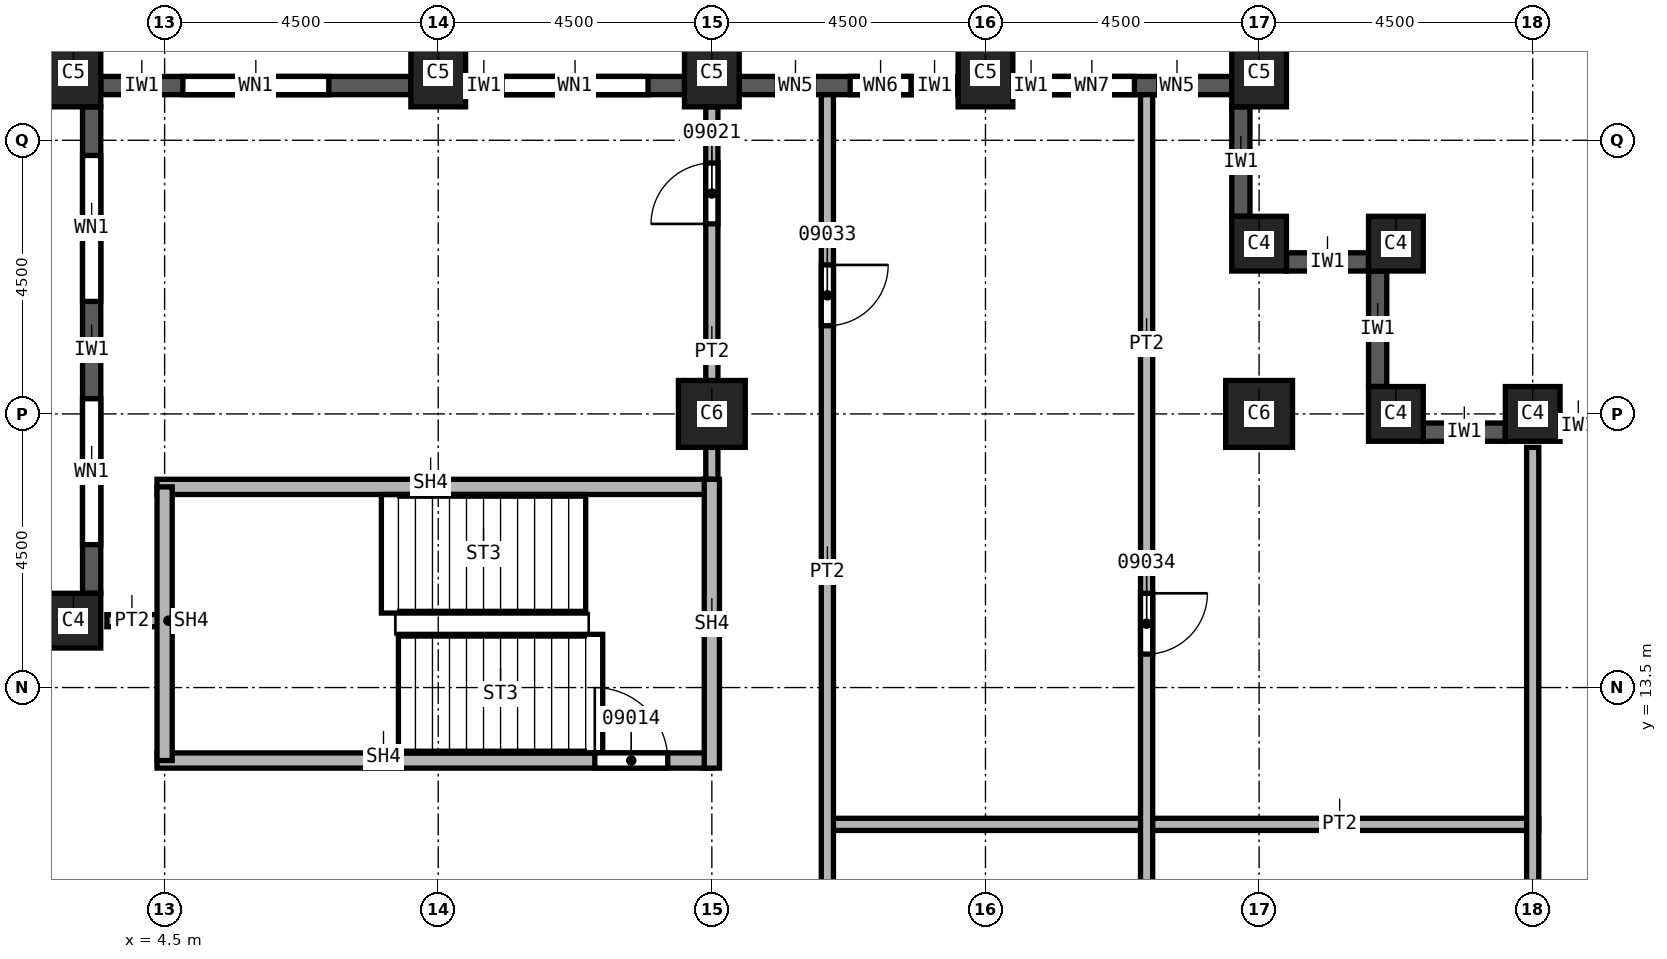
"""IFC4 building model, lengths in metres.
Left out: names, types, materials, properties, quantities, classifications, styles, units other than length and angle.
Written with IfcOpenShell. Run it as: python <this file> out.ifc"""

import sys

from ifc_helpers import new_model, si_unit, direction, frame, frame_2d, origin, origin_2d, place, context, subcontext, project, spatial, rectangle, extrude, element, fill, save


model = new_model("IFC4")
c1 = context("Model", 3, precision=1e-05, world=origin(), true_north=direction((0.0, 1.0)))
c2 = subcontext(c1, "Body", "Model", "MODEL_VIEW")
j1 = project(units=[si_unit("LENGTHUNIT", "METRE"), si_unit("PLANEANGLEUNIT", "RADIAN")], contexts=[c1])
p1 = place(None, origin())
s1 = spatial("IfcSite", under=j1, at=p1, CompositionType="ELEMENT")
p2 = place(p1, origin())
s2 = spatial("IfcBuilding", under=s1, at=p2, CompositionType="ELEMENT")
p3 = place(p2, frame((0.0, 0.0, 166.0)))
s3 = spatial("IfcBuildingStorey", under=s2, at=p3, CompositionType="ELEMENT", Elevation=166.0)
for number, where, z_axis, x_axis in (
    (1, (13.5, 18.0, 0.0), (0.0, 0.0, 1.0), (1.0, 0.0, 0.0)),
    (2, (22.5, 18.0, 0.0), (0.0, 0.0, 1.0), (1.0, 0.0, 0.0)),
):
    element("IfcColumn", number, at=place(p3, frame(where, z_axis=z_axis, x_axis=x_axis)), inside=s3, PredefinedType="COLUMN", context=c2, shape_type="SweptSolid", body=[
        extrude(rectangle(XDim=1.1, YDim=1.1, at=origin_2d()), origin(), (0.0, 0.0, 1.0), 3.7),
    ])
p4 = place(p3, frame((27.0, 18.0, 0.0), z_axis=(0.0, 0.0, 1.0), x_axis=(1.0, 0.0, 0.0)))
e3 = element("IfcColumn", 3, at=p4, inside=s3, PredefinedType="COLUMN", context=c2, shape_type="SweptSolid", body=[
    extrude(rectangle(XDim=0.9, YDim=0.9, at=origin_2d()), origin(), (0.0, 0.0, 1.0), 3.7),
])
for number, where, z_axis, x_axis in (
    (4, (3.0, 23.6, 0.0), (0.0, 0.0, 1.0), (1.0, 0.0, 0.0)),
    (5, (9.0, 23.6, 0.0), (0.0, 0.0, 1.0), (1.0, 0.0, 0.0)),
    (6, (13.5, 23.6, 0.0), (0.0, 0.0, 1.0), (1.0, 0.0, 0.0)),
    (7, (18.0, 23.6, 0.0), (0.0, 0.0, 1.0), (1.0, 0.0, 0.0)),
    (8, (22.5, 23.6, 0.0), (0.0, 0.0, 1.0), (1.0, 0.0, 0.0)),
):
    element("IfcColumn", number, at=place(p3, frame(where, z_axis=z_axis, x_axis=x_axis)), inside=s3, PredefinedType="COLUMN", context=c2, shape_type="SweptSolid", body=[
        extrude(rectangle(XDim=0.9, YDim=1.1, at=origin_2d()), origin(), (0.0, 0.0, 1.0), 3.7),
    ])
for number, where, z_axis, x_axis in (
    (9, (3.0, 14.6, 0.0), (0.0, 0.0, 1.0), (1.0, 0.0, 0.0)),
    (10, (22.5, 20.8, 0.0), (0.0, 0.0, 1.0), (1.0, 0.0, 0.0)),
    (11, (24.75, 20.8, 0.0), (0.0, 0.0, 1.0), (1.0, 0.0, 0.0)),
    (12, (24.75, 18.0, 0.0), (0.0, 0.0, 1.0), (1.0, 0.0, 0.0)),
):
    element("IfcColumn", number, at=place(p3, frame(where, z_axis=z_axis, x_axis=x_axis)), inside=s3, PredefinedType="COLUMN", context=c2, shape_type="SweptSolid", body=[
        extrude(rectangle(XDim=0.9, YDim=0.9, at=origin_2d()), origin(), (0.0, 0.0, 1.0), 3.7),
    ])
p5 = place(p3, frame((31.05, 17.8, 0.0), z_axis=(0.0, 0.0, 1.0), x_axis=(-1.0, 0.0, 0.0)))
e13 = element("IfcWall", 13, at=p5, inside=s3, PredefinedType="SOLIDWALL", context=c2, shape_type="SweptSolid", body=[
    extrude(rectangle(XDim=3.6, YDim=0.3, at=frame_2d((1.8, 0.0))), origin(), (0.0, 0.0, 1.0), 3.1),
])
p6 = place(p5, frame((0.6, 0.0, 0.8)))
e14 = element("IfcOpeningElement", 14, at=p6, cuts=e13, PredefinedType="OPENING", context=c2, shape_type="SweptSolid", body=[
    extrude(rectangle(XDim=2.4, YDim=1.95, at=frame_2d((1.2, 0.975))), frame((0.0, 0.15, 0.0), z_axis=(0.0, -1.0, 0.0), x_axis=(1.0, 0.0, 0.0)), (0.0, 0.0, 1.0), 0.3),
])
p7 = place(p3, frame((26.55, 17.7, 0.0), z_axis=(0.0, 0.0, 1.0), x_axis=(-1.0, 0.0, 0.0)))
e15 = element("IfcWall", 15, at=p7, inside=s3, PredefinedType="SOLIDWALL", context=c2, shape_type="SweptSolid", body=[
    extrude(rectangle(XDim=1.35, YDim=0.3, at=frame_2d((0.675, 0.0))), origin(), (0.0, 0.0, 1.0), 3.1),
])
p8 = place(p3, frame((24.45, 18.45, 0.0), z_axis=(0.0, 0.0, 1.0), x_axis=(0.0, 1.0, 0.0)))
e16 = element("IfcWall", 16, at=p8, inside=s3, PredefinedType="SOLIDWALL", context=c2, shape_type="SweptSolid", body=[
    extrude(rectangle(XDim=1.9, YDim=0.3, at=frame_2d((0.95, 0.0))), origin(), (0.0, 0.0, 1.0), 3.1),
])
p9 = place(p3, frame((24.3, 20.5, 0.0), z_axis=(0.0, 0.0, 1.0), x_axis=(-1.0, 0.0, 0.0)))
e17 = element("IfcWall", 17, at=p9, inside=s3, PredefinedType="SOLIDWALL", context=c2, shape_type="SweptSolid", body=[
    extrude(rectangle(XDim=1.35, YDim=0.3, at=frame_2d((0.675, 0.0))), origin(), (0.0, 0.0, 1.0), 3.1),
])
p10 = place(p3, frame((22.2, 21.25, 0.0), z_axis=(0.0, 0.0, 1.0), x_axis=(0.0, 1.0, 0.0)))
e18 = element("IfcWall", 18, at=p10, inside=s3, PredefinedType="SOLIDWALL", context=c2, shape_type="SweptSolid", body=[
    extrude(rectangle(XDim=1.8, YDim=0.3, at=frame_2d((0.9, 0.0))), origin(), (0.0, 0.0, 1.0), 3.1),
])
p11 = place(p3, frame((22.05, 23.4, 0.0), z_axis=(0.0, 0.0, 1.0), x_axis=(-1.0, 0.0, 0.0)))
e19 = element("IfcWall", 19, at=p11, inside=s3, PredefinedType="SOLIDWALL", context=c2, shape_type="SweptSolid", body=[
    extrude(rectangle(XDim=3.6, YDim=0.3, at=frame_2d((1.8, 0.0))), origin(), (0.0, 0.0, 1.0), 3.1),
])
p12 = place(p11, frame((0.6, 0.0, 0.8)))
e20 = element("IfcOpeningElement", 20, at=p12, cuts=e19, PredefinedType="OPENING", context=c2, shape_type="SweptSolid", body=[
    extrude(rectangle(XDim=0.6, YDim=1.95, at=frame_2d((0.3, 0.975))), frame((0.0, 0.15, 0.0), z_axis=(0.0, -1.0, 0.0), x_axis=(1.0, 0.0, 0.0)), (0.0, 0.0, 1.0), 0.3),
])
p13 = place(p11, frame((1.6, 0.0, 0.8)))
e21 = element("IfcOpeningElement", 21, at=p13, cuts=e19, PredefinedType="OPENING", context=c2, shape_type="SweptSolid", body=[
    extrude(rectangle(XDim=1.4, YDim=1.95, at=frame_2d((0.7, 0.975))), frame((0.0, 0.15, 0.0), z_axis=(0.0, -1.0, 0.0), x_axis=(1.0, 0.0, 0.0)), (0.0, 0.0, 1.0), 0.3),
])
p14 = place(p3, frame((17.55, 23.4, 0.0), z_axis=(0.0, 0.0, 1.0), x_axis=(-1.0, 0.0, 0.0)))
e22 = element("IfcWall", 22, at=p14, inside=s3, PredefinedType="SOLIDWALL", context=c2, shape_type="SweptSolid", body=[
    extrude(rectangle(XDim=3.6, YDim=0.3, at=frame_2d((1.8, 0.0))), origin(), (0.0, 0.0, 1.0), 3.1),
])
p15 = place(p14, frame((0.775, 0.0, 0.8)))
e23 = element("IfcOpeningElement", 23, at=p15, cuts=e22, PredefinedType="OPENING", context=c2, shape_type="SweptSolid", body=[
    extrude(rectangle(XDim=1.0, YDim=1.95, at=frame_2d((0.5, 0.975))), frame((0.0, 0.15, 0.0), z_axis=(0.0, -1.0, 0.0), x_axis=(1.0, 0.0, 0.0)), (0.0, 0.0, 1.0), 0.3),
])
p16 = place(p14, frame((2.375, 0.0, 0.8)))
e24 = element("IfcOpeningElement", 24, at=p16, cuts=e22, PredefinedType="OPENING", context=c2, shape_type="SweptSolid", body=[
    extrude(rectangle(XDim=0.6, YDim=1.95, at=frame_2d((0.3, 0.975))), frame((0.0, 0.15, 0.0), z_axis=(0.0, -1.0, 0.0), x_axis=(1.0, 0.0, 0.0)), (0.0, 0.0, 1.0), 0.3),
])
p17 = place(p3, frame((13.05, 23.4, 0.0), z_axis=(0.0, 0.0, 1.0), x_axis=(-1.0, 0.0, 0.0)))
e25 = element("IfcWall", 25, at=p17, inside=s3, PredefinedType="SOLIDWALL", context=c2, shape_type="SweptSolid", body=[
    extrude(rectangle(XDim=3.6, YDim=0.3, at=frame_2d((1.8, 0.0))), origin(), (0.0, 0.0, 1.0), 3.1),
])
p18 = place(p17, frame((0.6, 0.0, 0.8)))
e26 = element("IfcOpeningElement", 26, at=p18, cuts=e25, PredefinedType="OPENING", context=c2, shape_type="SweptSolid", body=[
    extrude(rectangle(XDim=2.4, YDim=1.95, at=frame_2d((1.2, 0.975))), frame((0.0, 0.15, 0.0), z_axis=(0.0, -1.0, 0.0), x_axis=(1.0, 0.0, 0.0)), (0.0, 0.0, 1.0), 0.3),
])
p19 = place(p3, frame((8.55, 23.4, 0.0), z_axis=(0.0, 0.0, 1.0), x_axis=(-1.0, 0.0, 0.0)))
e27 = element("IfcWall", 27, at=p19, inside=s3, PredefinedType="SOLIDWALL", context=c2, shape_type="SweptSolid", body=[
    extrude(rectangle(XDim=5.1, YDim=0.3, at=frame_2d((2.55, 0.0))), origin(), (0.0, 0.0, 1.0), 3.1),
])
p20 = place(p19, frame((1.35, 0.0, 0.8)))
e28 = element("IfcOpeningElement", 28, at=p20, cuts=e27, PredefinedType="OPENING", context=c2, shape_type="SweptSolid", body=[
    extrude(rectangle(XDim=2.4, YDim=1.95, at=frame_2d((1.2, 0.975))), frame((0.0, 0.15, 0.0), z_axis=(0.0, -1.0, 0.0), x_axis=(1.0, 0.0, 0.0)), (0.0, 0.0, 1.0), 0.3),
])
p21 = place(p3, frame((3.3, 23.05, 0.0), z_axis=(0.0, 0.0, 1.0), x_axis=(0.0, -1.0, 0.0)))
e29 = element("IfcWall", 29, at=p21, inside=s3, PredefinedType="SOLIDWALL", context=c2, shape_type="SweptSolid", body=[
    extrude(rectangle(XDim=8.0, YDim=0.3, at=frame_2d((4.0, 0.0))), origin(), (0.0, 0.0, 1.0), 3.1),
])
p22 = place(p21, frame((0.8, 0.0, 0.8)))
e30 = element("IfcOpeningElement", 30, at=p22, cuts=e29, PredefinedType="OPENING", context=c2, shape_type="SweptSolid", body=[
    extrude(rectangle(XDim=2.4, YDim=1.95, at=frame_2d((1.2, 0.975))), frame((0.0, 0.15, 0.0), z_axis=(0.0, -1.0, 0.0), x_axis=(1.0, 0.0, 0.0)), (0.0, 0.0, 1.0), 0.3),
])
p23 = place(p21, frame((4.8, 0.0, 0.8)))
e31 = element("IfcOpeningElement", 31, at=p23, cuts=e29, PredefinedType="OPENING", context=c2, shape_type="SweptSolid", body=[
    extrude(rectangle(XDim=2.4, YDim=1.95, at=frame_2d((1.2, 0.975))), frame((0.0, 0.15, 0.0), z_axis=(0.0, -1.0, 0.0), x_axis=(1.0, 0.0, 0.0)), (0.0, 0.0, 1.0), 0.3),
])
p24 = place(p3, frame((3.55, 14.6, 0.0), z_axis=(0.0, 0.0, 1.0), x_axis=(1.0, 0.0, 0.0)))
e32 = element("IfcWall", 32, at=p24, inside=s3, PredefinedType="PARTITIONING", context=c2, shape_type="SweptSolid", body=[
    extrude(rectangle(XDim=0.95, YDim=0.2, at=frame_2d((0.475, 0.0))), origin(), (0.0, 0.0, 1.0), 3.7),
])
p25 = place(p3, frame((13.5, 16.675, 0.0), z_axis=(0.0, 0.0, 1.0), x_axis=(0.0, 1.0, 0.0)))
e33 = element("IfcWall", 33, at=p25, inside=s3, PredefinedType="PARTITIONING", context=c2, shape_type="SweptSolid", body=[
    extrude(rectangle(XDim=6.375, YDim=0.2, at=frame_2d((3.188, 0.0))), origin(), (0.0, 0.0, 1.0), 3.7),
])
p26 = place(p25, frame((4.45, 0.0, 0.0)))
e34 = element("IfcOpeningElement", 34, at=p26, cuts=e33, PredefinedType="OPENING", context=c2, shape_type="SweptSolid", body=[
    extrude(rectangle(XDim=1.0, YDim=2.1, at=frame_2d((0.5, 1.05))), frame((0.0, 0.1, 0.0), z_axis=(0.0, -1.0, 0.0), x_axis=(1.0, 0.0, 0.0)), (0.0, 0.0, 1.0), 0.2),
])
p27 = place(p3, frame((15.4, 11.25, 0.0), z_axis=(0.0, 0.0, 1.0), x_axis=(1.0, 0.0, 0.0)))
e35 = element("IfcWall", 35, at=p27, inside=s3, PredefinedType="PARTITIONING", context=c2, shape_type="SweptSolid", body=[
    extrude(rectangle(XDim=11.7, YDim=0.2, at=frame_2d((5.85, 0.0))), origin(), (0.0, 0.0, 1.0), 3.7),
])
p28 = place(p3, frame((15.4, 23.25, 0.0), z_axis=(0.0, 0.0, 1.0), x_axis=(0.0, -1.0, 0.0)))
e36 = element("IfcWall", 36, at=p28, inside=s3, PredefinedType="PARTITIONING", context=c2, shape_type="SweptSolid", body=[
    extrude(rectangle(XDim=24.1, YDim=0.2, at=frame_2d((12.05, 0.0))), origin(), (0.0, 0.0, 1.0), 3.7),
])
p29 = place(p28, frame((16.65, 0.0, 0.0)))
e37 = element("IfcOpeningElement", 37, at=p29, cuts=e36, PredefinedType="OPENING", context=c2, shape_type="SweptSolid", body=[
    extrude(rectangle(XDim=1.0, YDim=2.1, at=frame_2d((0.5, 1.05))), frame((0.0, 0.1, 0.0), z_axis=(0.0, -1.0, 0.0), x_axis=(1.0, 0.0, 0.0)), (0.0, 0.0, 1.0), 0.2),
])
p30 = place(p28, frame((2.8, 0.0, 0.0)))
e38 = element("IfcOpeningElement", 38, at=p30, cuts=e36, PredefinedType="OPENING", context=c2, shape_type="SweptSolid", body=[
    extrude(rectangle(XDim=1.0, YDim=2.1, at=frame_2d((0.5, 1.05))), frame((0.0, 0.1, 0.0), z_axis=(0.0, -1.0, 0.0), x_axis=(1.0, 0.0, 0.0)), (0.0, 0.0, 1.0), 0.2),
])
p31 = place(p3, frame((20.65, 23.25, 0.0), z_axis=(0.0, 0.0, 1.0), x_axis=(0.0, -1.0, 0.0)))
e39 = element("IfcWall", 39, at=p31, inside=s3, PredefinedType="PARTITIONING", context=c2, shape_type="SweptSolid", body=[
    extrude(rectangle(XDim=24.0, YDim=0.2, at=frame_2d((12.0, 0.0))), origin(), (0.0, 0.0, 1.0), 3.7),
])
p32 = place(p31, frame((15.6, 0.0, 0.0)))
e40 = element("IfcOpeningElement", 40, at=p32, cuts=e39, PredefinedType="OPENING", context=c2, shape_type="SweptSolid", body=[
    extrude(rectangle(XDim=1.0, YDim=2.1, at=frame_2d((0.5, 1.05))), frame((0.0, 0.1, 0.0), z_axis=(0.0, -1.0, 0.0), x_axis=(1.0, 0.0, 0.0)), (0.0, 0.0, 1.0), 0.2),
])
p33 = place(p31, frame((8.2, 0.0, 0.0)))
e41 = element("IfcOpeningElement", 41, at=p33, cuts=e39, PredefinedType="OPENING", context=c2, shape_type="SweptSolid", body=[
    extrude(rectangle(XDim=1.0, YDim=2.1, at=frame_2d((0.5, 1.05))), frame((0.0, 0.1, 0.0), z_axis=(0.0, -1.0, 0.0), x_axis=(1.0, 0.0, 0.0)), (0.0, 0.0, 1.0), 0.2),
])
p34 = place(p3, frame((27.0, 17.45, 0.0), z_axis=(0.0, 0.0, 1.0), x_axis=(0.0, -1.0, 0.0)))
e42 = element("IfcWall", 42, at=p34, inside=s3, PredefinedType="PARTITIONING", context=c2, shape_type="SweptSolid", body=[
    extrude(rectangle(XDim=18.2, YDim=0.2, at=frame_2d((9.1, 0.0))), origin(), (0.0, 0.0, 1.0), 3.7),
])
p35 = place(p3, frame((4.375, 12.3, 0.0), z_axis=(0.0, 0.0, 1.0), x_axis=(1.0, 0.0, 0.0)))
e43 = element("IfcWall", 43, at=p35, inside=s3, PredefinedType="SOLIDWALL", context=c2, shape_type="SweptSolid", body=[
    extrude(rectangle(XDim=9.125, YDim=0.25, at=frame_2d((4.562, 0.0))), origin(), (0.0, 0.0, 1.0), 3.7),
])
p36 = place(p35, frame((7.2, 0.0, 0.0)))
e44 = element("IfcOpeningElement", 44, at=p36, cuts=e43, PredefinedType="OPENING", context=c2, shape_type="SweptSolid", body=[
    extrude(rectangle(XDim=1.2, YDim=2.1, at=frame_2d((0.6, 1.05))), frame((0.0, 0.125, 0.0), z_axis=(0.0, -1.0, 0.0), x_axis=(1.0, 0.0, 0.0)), (0.0, 0.0, 1.0), 0.25),
])
p37 = place(p3, frame((4.375, 16.8, 0.0), z_axis=(0.0, 0.0, 1.0), x_axis=(1.0, 0.0, 0.0)))
e45 = element("IfcWall", 45, at=p37, inside=s3, PredefinedType="SOLIDWALL", context=c2, shape_type="SweptSolid", body=[
    extrude(rectangle(XDim=9.125, YDim=0.25, at=frame_2d((4.562, 0.0))), origin(), (0.0, 0.0, 1.0), 3.7),
])
p38 = place(p3, frame((4.5, 12.3, 0.0), z_axis=(0.0, 0.0, 1.0), x_axis=(0.0, 1.0, 0.0)))
e46 = element("IfcWall", 46, at=p38, inside=s3, PredefinedType="SOLIDWALL", context=c2, shape_type="SweptSolid", body=[
    extrude(rectangle(XDim=4.5, YDim=0.25, at=frame_2d((2.25, 0.0))), origin(), (0.0, 0.0, 1.0), 3.7),
])
p39 = place(p3, frame((13.5, 12.175, 0.0), z_axis=(0.0, 0.0, 1.0), x_axis=(0.0, 1.0, 0.0)))
e47 = element("IfcWall", 47, at=p39, inside=s3, PredefinedType="SOLIDWALL", context=c2, shape_type="SweptSolid", body=[
    extrude(rectangle(XDim=4.75, YDim=0.25, at=frame_2d((2.375, 0.0))), origin(), (0.0, 0.0, 1.0), 3.7),
])
p40 = place(p18, origin())
e48 = element("IfcWindow", 48, at=p40, inside=s3, PartitioningType="SINGLE_PANEL", PredefinedType="WINDOW", context=c2, shape_type="SweptSolid", body=[
    extrude(rectangle(XDim=2.4, YDim=1.95, at=frame_2d((1.2, 0.975))), frame((0.0, 0.03, 0.0), z_axis=(0.0, -1.0, 0.0), x_axis=(1.0, 0.0, 0.0)), (0.0, 0.0, 1.0), 0.06),
])
fill(e26, e48)
p41 = place(p20, origin())
e49 = element("IfcWindow", 49, at=p41, inside=s3, PartitioningType="SINGLE_PANEL", PredefinedType="WINDOW", context=c2, shape_type="SweptSolid", body=[
    extrude(rectangle(XDim=2.4, YDim=1.95, at=frame_2d((1.2, 0.975))), frame((0.0, 0.03, 0.0), z_axis=(0.0, -1.0, 0.0), x_axis=(1.0, 0.0, 0.0)), (0.0, 0.0, 1.0), 0.06),
])
fill(e28, e49)
p42 = place(p22, origin())
e50 = element("IfcWindow", 50, at=p42, inside=s3, PartitioningType="SINGLE_PANEL", PredefinedType="WINDOW", context=c2, shape_type="SweptSolid", body=[
    extrude(rectangle(XDim=2.4, YDim=1.95, at=frame_2d((1.2, 0.975))), frame((0.0, 0.03, 0.0), z_axis=(0.0, -1.0, 0.0), x_axis=(1.0, 0.0, 0.0)), (0.0, 0.0, 1.0), 0.06),
])
fill(e30, e50)
p43 = place(p23, origin())
e51 = element("IfcWindow", 51, at=p43, inside=s3, PartitioningType="SINGLE_PANEL", PredefinedType="WINDOW", context=c2, shape_type="SweptSolid", body=[
    extrude(rectangle(XDim=2.4, YDim=1.95, at=frame_2d((1.2, 0.975))), frame((0.0, 0.03, 0.0), z_axis=(0.0, -1.0, 0.0), x_axis=(1.0, 0.0, 0.0)), (0.0, 0.0, 1.0), 0.06),
])
fill(e31, e51)
p44 = place(p36, origin())
e52 = element("IfcDoor", 52, at=p44, inside=s3, OperationType="SINGLE_SWING_LEFT", PredefinedType="DOOR", context=c2, shape_type="SweptSolid", body=[
    extrude(rectangle(XDim=1.2, YDim=2.1, at=frame_2d((0.6, 1.05))), frame((0.0, 0.025, 0.0), z_axis=(0.0, -1.0, 0.0), x_axis=(1.0, 0.0, 0.0)), (0.0, 0.0, 1.0), 0.05),
])
fill(e44, e52)
p45 = place(p26, origin())
e53 = element("IfcDoor", 53, at=p45, inside=s3, OperationType="SINGLE_SWING_RIGHT", PredefinedType="DOOR", context=c2, shape_type="SweptSolid", body=[
    extrude(rectangle(XDim=1.0, YDim=2.1, at=frame_2d((0.5, 1.05))), frame((0.0, 0.025, 0.0), z_axis=(0.0, -1.0, 0.0), x_axis=(1.0, 0.0, 0.0)), (0.0, 0.0, 1.0), 0.05),
])
fill(e34, e53)
p46 = place(p30, origin())
e54 = element("IfcDoor", 54, at=p46, inside=s3, OperationType="SINGLE_SWING_RIGHT", PredefinedType="DOOR", context=c2, shape_type="SweptSolid", body=[
    extrude(rectangle(XDim=1.0, YDim=2.1, at=frame_2d((0.5, 1.05))), frame((0.0, 0.025, 0.0), z_axis=(0.0, -1.0, 0.0), x_axis=(1.0, 0.0, 0.0)), (0.0, 0.0, 1.0), 0.05),
])
fill(e38, e54)
p47 = place(p33, origin())
e55 = element("IfcDoor", 55, at=p47, inside=s3, OperationType="SINGLE_SWING_LEFT", PredefinedType="DOOR", context=c2, shape_type="SweptSolid", body=[
    extrude(rectangle(XDim=1.0, YDim=2.1, at=frame_2d((0.5, 1.05))), frame((0.0, 0.025, 0.0), z_axis=(0.0, -1.0, 0.0), x_axis=(1.0, 0.0, 0.0)), (0.0, 0.0, 1.0), 0.05),
])
fill(e41, e55)
p48 = place(p12, origin())
e56 = element("IfcWindow", 56, at=p48, inside=s3, PartitioningType="SINGLE_PANEL", PredefinedType="WINDOW", context=c2, shape_type="SweptSolid", body=[
    extrude(rectangle(XDim=0.6, YDim=1.95, at=frame_2d((0.3, 0.975))), frame((0.0, 0.03, 0.0), z_axis=(0.0, -1.0, 0.0), x_axis=(1.0, 0.0, 0.0)), (0.0, 0.0, 1.0), 0.06),
])
fill(e20, e56)
p49 = place(p13, origin())
e57 = element("IfcWindow", 57, at=p49, inside=s3, PartitioningType="SINGLE_PANEL", PredefinedType="WINDOW", context=c2, shape_type="SweptSolid", body=[
    extrude(rectangle(XDim=1.4, YDim=1.95, at=frame_2d((0.7, 0.975))), frame((0.0, 0.03, 0.0), z_axis=(0.0, -1.0, 0.0), x_axis=(1.0, 0.0, 0.0)), (0.0, 0.0, 1.0), 0.06),
])
fill(e21, e57)
p50 = place(p15, origin())
e58 = element("IfcWindow", 58, at=p50, inside=s3, PartitioningType="SINGLE_PANEL", PredefinedType="WINDOW", context=c2, shape_type="SweptSolid", body=[
    extrude(rectangle(XDim=1.0, YDim=1.95, at=frame_2d((0.5, 0.975))), frame((0.0, 0.03, 0.0), z_axis=(0.0, -1.0, 0.0), x_axis=(1.0, 0.0, 0.0)), (0.0, 0.0, 1.0), 0.06),
])
fill(e23, e58)
p51 = place(p16, origin())
e59 = element("IfcWindow", 59, at=p51, inside=s3, PartitioningType="SINGLE_PANEL", PredefinedType="WINDOW", context=c2, shape_type="SweptSolid", body=[
    extrude(rectangle(XDim=0.6, YDim=1.95, at=frame_2d((0.3, 0.975))), frame((0.0, 0.03, 0.0), z_axis=(0.0, -1.0, 0.0), x_axis=(1.0, 0.0, 0.0)), (0.0, 0.0, 1.0), 0.06),
])
fill(e24, e59)
save(model, sys.argv[1])
